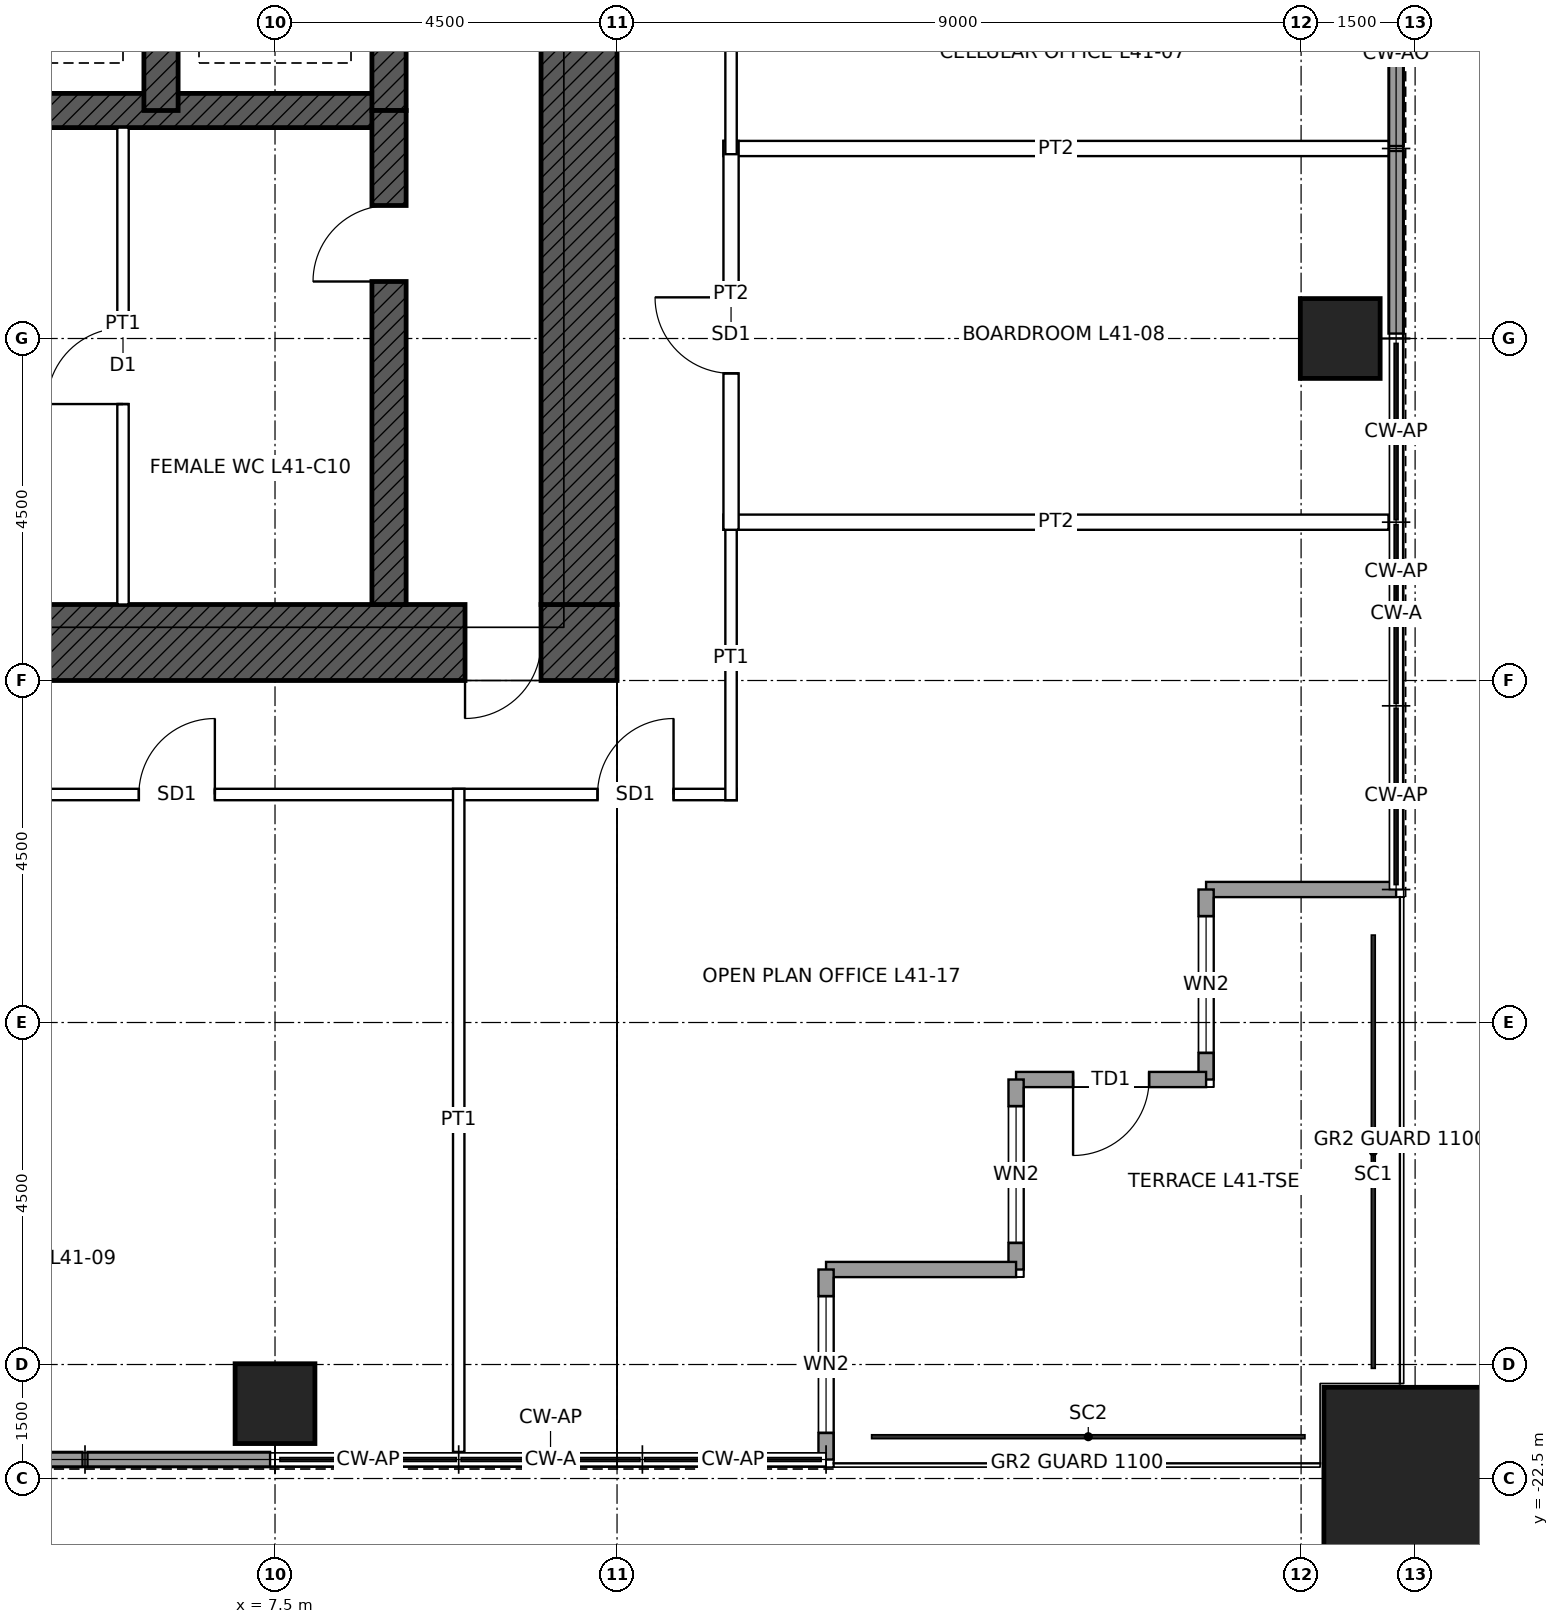
"""IFC4 building model, lengths in metres.
Left out: names, types, materials, properties, quantities, classifications, styles, units other than length and angle.
Written with IfcOpenShell. Run it as: python <this file> out.ifc"""

import sys

from ifc_helpers import new_model, si_unit, direction, frame, frame_2d, origin, origin_2d, place, context, subcontext, project, spatial, rectangle, hollow_rectangle, extrude, element, fill, save


model = new_model("IFC4")
c1 = context("Model", 3, precision=1e-05, world=origin(), true_north=direction((0.0, 1.0)))
c2 = subcontext(c1, "Body", "Model", "MODEL_VIEW")
j1 = project(units=[si_unit("LENGTHUNIT", "METRE"), si_unit("PLANEANGLEUNIT", "RADIAN")], contexts=[c1])
p1 = place(None, origin())
s1 = spatial("IfcSite", under=j1, at=p1, CompositionType="ELEMENT")
p2 = place(p1, origin())
s2 = spatial("IfcBuilding", under=s1, at=p2, CompositionType="ELEMENT")
p3 = place(p2, frame((0.0, 0.0, 197.9)))
s3 = spatial("IfcBuildingStorey", under=s2, at=p3, CompositionType="ELEMENT", Elevation=197.9)
p4 = place(p3, frame((22.5, -22.5, 0.0), z_axis=(0.0, 0.0, 1.0), x_axis=(1.0, 0.0, 0.0)))
e1 = element("IfcColumn", 1, at=p4, inside=s3, PredefinedType="COLUMN", context=c2, shape_type="SweptSolid", body=[
    extrude(hollow_rectangle(XDim=2.4, YDim=2.4, WallThickness=0.12, at=origin_2d()), origin(), (0.0, 0.0, 1.0), 4.0),
])
for number, where, z_axis, x_axis in (
    (2, (21.515, -7.5, 0.0), (0.0, 0.0, 1.0), (1.0, 0.0, 0.0)),
    (3, (7.5, -21.515, 0.0), (0.0, 0.0, 1.0), (1.0, 0.0, 0.0)),
):
    element("IfcColumn", number, at=place(p3, frame(where, z_axis=z_axis, x_axis=x_axis)), inside=s3, PredefinedType="COLUMN", context=c2, shape_type="SweptSolid", body=[
        extrude(hollow_rectangle(XDim=1.05, YDim=1.05, WallThickness=0.07, at=origin_2d()), origin(), (0.0, 0.0, 1.0), 4.0),
    ])
p5 = place(p3, frame((12.0, -11.5, 0.0), z_axis=(0.0, 0.0, 1.0), x_axis=(-1.0, 0.0, 0.0)))
e4 = element("IfcWall", 4, at=p5, inside=s3, PredefinedType="SHEAR", context=c2, shape_type="SweptSolid", body=[
    extrude(rectangle(XDim=24.0, YDim=1.0, at=frame_2d((12.0, 0.0))), origin(), (0.0, 0.0, 1.0), 4.0),
])
p6 = place(p5, frame((11.5, 0.0, 0.0)))
e5 = element("IfcOpeningElement", 5, at=p6, cuts=e4, PredefinedType="OPENING", context=c2, shape_type="SweptSolid", body=[
    extrude(rectangle(XDim=1.0, YDim=2.1, at=frame_2d((0.5, 1.05))), frame((0.0, 0.51, 0.0), z_axis=(0.0, -1.0, 0.0), x_axis=(1.0, 0.0, 0.0)), (0.0, 0.0, 1.0), 1.02),
])
p7 = place(p5, frame((1.0, 0.0, 0.0)))
e6 = element("IfcOpeningElement", 6, at=p7, cuts=e4, PredefinedType="OPENING", context=c2, shape_type="SweptSolid", body=[
    extrude(rectangle(XDim=1.0, YDim=2.4, at=frame_2d((0.5, 1.2))), frame((0.0, 0.51, 0.0), z_axis=(0.0, -1.0, 0.0), x_axis=(1.0, 0.0, 0.0)), (0.0, 0.0, 1.0), 1.02),
])
p8 = place(p3, frame((11.5, 11.0, 0.0), z_axis=(0.0, 0.0, 1.0), x_axis=(0.0, -1.0, 0.0)))
e7 = element("IfcWall", 7, at=p8, inside=s3, PredefinedType="SHEAR", context=c2, shape_type="SweptSolid", body=[
    extrude(rectangle(XDim=22.0, YDim=1.0, at=frame_2d((11.0, 0.0))), origin(), (0.0, 0.0, 1.0), 4.0),
])
p9 = place(p8, frame((10.5, 0.0, 0.0)))
e8 = element("IfcOpeningElement", 8, at=p9, cuts=e7, PredefinedType="OPENING", context=c2, shape_type="SweptSolid", body=[
    extrude(rectangle(XDim=1.0, YDim=2.4, at=frame_2d((0.5, 1.2))), frame((0.0, 0.51, 0.0), z_axis=(0.0, -1.0, 0.0), x_axis=(1.0, 0.0, 0.0)), (0.0, 0.0, 1.0), 1.02),
])
p10 = place(p3, frame((-9.0, -4.5, 0.0), z_axis=(0.0, 0.0, 1.0), x_axis=(1.0, 0.0, 0.0)))
e9 = element("IfcWall", 9, at=p10, inside=s3, PredefinedType="SHEAR", context=c2, shape_type="SweptSolid", body=[
    extrude(rectangle(XDim=18.0, YDim=0.45, at=frame_2d((9.0, 0.0))), origin(), (0.0, 0.0, 1.0), 4.0),
])
for number, where, z_axis, x_axis in (
    (10, (9.0, -4.5, 0.0), (0.0, 0.0, 1.0), (0.0, 1.0, 0.0)),
    (11, (6.0, -4.5, 0.0), (0.0, 0.0, 1.0), (0.0, 1.0, 0.0)),
):
    element("IfcWall", number, at=place(p3, frame(where, z_axis=z_axis, x_axis=x_axis)), inside=s3, PredefinedType="SHEAR", context=c2, shape_type="SweptSolid", body=[
        extrude(rectangle(XDim=3.0, YDim=0.45, at=frame_2d((1.5, 0.0))), origin(), (0.0, 0.0, 1.0), 4.0),
    ])
p11 = place(p3, frame((9.0, -11.0, 0.0), z_axis=(0.0, 0.0, 1.0), x_axis=(0.0, 1.0, 0.0)))
e12 = element("IfcWall", 12, at=p11, inside=s3, PredefinedType="SHEAR", context=c2, shape_type="SweptSolid", body=[
    extrude(rectangle(XDim=6.5, YDim=0.45, at=frame_2d((3.25, 0.0))), origin(), (0.0, 0.0, 1.0), 4.0),
])
p12 = place(p11, frame((4.25, 0.0, 0.0)))
e13 = element("IfcOpeningElement", 13, at=p12, cuts=e12, PredefinedType="OPENING", context=c2, shape_type="SweptSolid", body=[
    extrude(rectangle(XDim=1.0, YDim=2.1, at=frame_2d((0.5, 1.05))), frame((0.0, 0.235, 0.0), z_axis=(0.0, -1.0, 0.0), x_axis=(1.0, 0.0, 0.0)), (0.0, 0.0, 1.0), 0.47),
])
p13 = place(p3, frame((22.25, -14.75, 0.0), z_axis=(0.0, 0.0, 1.0), x_axis=(-1.0, 0.0, 0.0)))
e14 = element("IfcWall", 14, at=p13, inside=s3, PredefinedType="SOLIDWALL", context=c2, shape_type="SweptSolid", body=[
    extrude(rectangle(XDim=2.5, YDim=0.2, at=frame_2d((1.25, 0.0))), origin(), (0.0, 0.0, 1.0), 3.85),
])
p14 = place(p3, frame((19.75, -14.75, 0.0), z_axis=(0.0, 0.0, 1.0), x_axis=(0.0, -1.0, 0.0)))
e15 = element("IfcWall", 15, at=p14, inside=s3, PredefinedType="SOLIDWALL", context=c2, shape_type="SweptSolid", body=[
    extrude(rectangle(XDim=2.5, YDim=0.2, at=frame_2d((1.25, 0.0))), origin(), (0.0, 0.0, 1.0), 3.85),
])
p15 = place(p14, frame((0.35, 0.0, 0.3)))
e16 = element("IfcOpeningElement", 16, at=p15, cuts=e15, PredefinedType="OPENING", context=c2, shape_type="SweptSolid", body=[
    extrude(rectangle(XDim=1.8, YDim=2.4, at=frame_2d((0.9, 1.2))), frame((0.0, 0.11, 0.0), z_axis=(0.0, -1.0, 0.0), x_axis=(1.0, 0.0, 0.0)), (0.0, 0.0, 1.0), 0.22),
])
p16 = place(p3, frame((19.75, -17.25, 0.0), z_axis=(0.0, 0.0, 1.0), x_axis=(-1.0, 0.0, 0.0)))
e17 = element("IfcWall", 17, at=p16, inside=s3, PredefinedType="SOLIDWALL", context=c2, shape_type="SweptSolid", body=[
    extrude(rectangle(XDim=2.5, YDim=0.2, at=frame_2d((1.25, 0.0))), origin(), (0.0, 0.0, 1.0), 3.85),
])
p17 = place(p16, frame((0.75, 0.0, 0.0)))
e18 = element("IfcOpeningElement", 18, at=p17, cuts=e17, PredefinedType="OPENING", context=c2, shape_type="SweptSolid", body=[
    extrude(rectangle(XDim=1.0, YDim=2.4, at=frame_2d((0.5, 1.2))), frame((0.0, 0.11, 0.0), z_axis=(0.0, -1.0, 0.0), x_axis=(1.0, 0.0, 0.0)), (0.0, 0.0, 1.0), 0.22),
])
p18 = place(p3, frame((17.25, -17.25, 0.0), z_axis=(0.0, 0.0, 1.0), x_axis=(0.0, -1.0, 0.0)))
e19 = element("IfcWall", 19, at=p18, inside=s3, PredefinedType="SOLIDWALL", context=c2, shape_type="SweptSolid", body=[
    extrude(rectangle(XDim=2.5, YDim=0.2, at=frame_2d((1.25, 0.0))), origin(), (0.0, 0.0, 1.0), 3.85),
])
p19 = place(p18, frame((0.35, 0.0, 0.3)))
e20 = element("IfcOpeningElement", 20, at=p19, cuts=e19, PredefinedType="OPENING", context=c2, shape_type="SweptSolid", body=[
    extrude(rectangle(XDim=1.8, YDim=2.4, at=frame_2d((0.9, 1.2))), frame((0.0, 0.11, 0.0), z_axis=(0.0, -1.0, 0.0), x_axis=(1.0, 0.0, 0.0)), (0.0, 0.0, 1.0), 0.22),
])
p20 = place(p3, frame((17.25, -19.75, 0.0), z_axis=(0.0, 0.0, 1.0), x_axis=(-1.0, 0.0, 0.0)))
e21 = element("IfcWall", 21, at=p20, inside=s3, PredefinedType="SOLIDWALL", context=c2, shape_type="SweptSolid", body=[
    extrude(rectangle(XDim=2.5, YDim=0.2, at=frame_2d((1.25, 0.0))), origin(), (0.0, 0.0, 1.0), 3.85),
])
p21 = place(p3, frame((14.75, -19.75, 0.0), z_axis=(0.0, 0.0, 1.0), x_axis=(0.0, -1.0, 0.0)))
e22 = element("IfcWall", 22, at=p21, inside=s3, PredefinedType="SOLIDWALL", context=c2, shape_type="SweptSolid", body=[
    extrude(rectangle(XDim=2.5, YDim=0.2, at=frame_2d((1.25, 0.0))), origin(), (0.0, 0.0, 1.0), 3.85),
])
p22 = place(p21, frame((0.35, 0.0, 0.3)))
e23 = element("IfcOpeningElement", 23, at=p22, cuts=e22, PredefinedType="OPENING", context=c2, shape_type="SweptSolid", body=[
    extrude(rectangle(XDim=1.8, YDim=2.4, at=frame_2d((0.9, 1.2))), frame((0.0, 0.11, 0.0), z_axis=(0.0, -1.0, 0.0), x_axis=(1.0, 0.0, 0.0)), (0.0, 0.0, 1.0), 0.22),
])
p23 = place(p3, frame((22.25, -2.532, 0.0), z_axis=(0.0, 0.0, 1.0), x_axis=(0.0, -1.0, 0.0)))
e24 = element("IfcWall", 24, at=p23, inside=s3, PredefinedType="SOLIDWALL", context=c2, shape_type="SweptSolid", body=[
    extrude(rectangle(XDim=2.435, YDim=0.2, at=frame_2d((1.218, 0.0))), origin(), (0.0, 0.0, 1.0), 3.85),
])
for number, where, z_axis, x_axis in (
    (25, (22.25, -5.032, 0.0), (0.0, 0.0, 1.0), (0.0, -1.0, 0.0)),
    (26, (7.435, -22.25, 0.0), (0.0, 0.0, 1.0), (-1.0, 0.0, 0.0)),
):
    element("IfcWall", number, at=place(p3, frame(where, z_axis=z_axis, x_axis=x_axis)), inside=s3, PredefinedType="SOLIDWALL", context=c2, shape_type="SweptSolid", body=[
        extrude(rectangle(XDim=2.403, YDim=0.2, at=frame_2d((1.201, 0.0))), origin(), (0.0, 0.0, 1.0), 3.85),
    ])
p24 = place(p3, frame((4.968, -22.25, 0.0), z_axis=(0.0, 0.0, 1.0), x_axis=(-1.0, 0.0, 0.0)))
e27 = element("IfcWall", 27, at=p24, inside=s3, PredefinedType="SOLIDWALL", context=c2, shape_type="SweptSolid", body=[
    extrude(rectangle(XDim=2.435, YDim=0.2, at=frame_2d((1.218, 0.0))), origin(), (0.0, 0.0, 1.0), 3.85),
])
p25 = place(p3, frame((-13.575, -13.5, 0.0), z_axis=(0.0, 0.0, 1.0), x_axis=(1.0, 0.0, 0.0)))
e28 = element("IfcWall", 28, at=p25, inside=s3, PredefinedType="PARTITIONING", context=c2, shape_type="SweptSolid", body=[
    extrude(rectangle(XDim=27.15, YDim=0.15, at=frame_2d((13.575, 0.0))), origin(), (0.0, 0.0, 1.0), 3.85),
])
p26 = place(p25, frame((19.283, 0.0, 0.0)))
e29 = element("IfcOpeningElement", 29, at=p26, cuts=e28, PredefinedType="OPENING", context=c2, shape_type="SweptSolid", body=[
    extrude(rectangle(XDim=1.0, YDim=2.4, at=frame_2d((0.5, 1.2))), frame((0.0, 0.085, 0.0), z_axis=(0.0, -1.0, 0.0), x_axis=(1.0, 0.0, 0.0)), (0.0, 0.0, 1.0), 0.17),
])
p27 = place(p25, frame((9.325, 0.0, 0.0)))
e30 = element("IfcOpeningElement", 30, at=p27, cuts=e28, PredefinedType="OPENING", context=c2, shape_type="SweptSolid", body=[
    extrude(rectangle(XDim=1.0, YDim=2.1, at=frame_2d((0.5, 1.05))), frame((0.0, 0.085, 0.0), z_axis=(0.0, -1.0, 0.0), x_axis=(1.0, 0.0, 0.0)), (0.0, 0.0, 1.0), 0.17),
])
p28 = place(p25, frame((3.825, 0.0, 0.0)))
e31 = element("IfcOpeningElement", 31, at=p28, cuts=e28, PredefinedType="OPENING", context=c2, shape_type="SweptSolid", body=[
    extrude(rectangle(XDim=1.0, YDim=2.4, at=frame_2d((0.5, 1.2))), frame((0.0, 0.085, 0.0), z_axis=(0.0, -1.0, 0.0), x_axis=(1.0, 0.0, 0.0)), (0.0, 0.0, 1.0), 0.17),
])
p29 = place(p25, frame((25.318, 0.0, 0.0)))
e32 = element("IfcOpeningElement", 32, at=p29, cuts=e28, PredefinedType="OPENING", context=c2, shape_type="SweptSolid", body=[
    extrude(rectangle(XDim=1.0, YDim=2.4, at=frame_2d((0.5, 1.2))), frame((0.0, 0.085, 0.0), z_axis=(0.0, -1.0, 0.0), x_axis=(1.0, 0.0, 0.0)), (0.0, 0.0, 1.0), 0.17),
])
for number, where, z_axis, x_axis in (
    (33, (13.4, -9.917, 0.0), (0.0, 0.0, 1.0), (1.0, 0.0, 0.0)),
    (34, (13.4, -5.0, 0.0), (0.0, 0.0, 1.0), (1.0, 0.0, 0.0)),
):
    element("IfcWall", number, at=place(p3, frame(where, z_axis=z_axis, x_axis=x_axis)), inside=s3, PredefinedType="PARTITIONING", context=c2, shape_type="SweptSolid", body=[
        extrude(rectangle(XDim=8.75, YDim=0.2, at=frame_2d((4.375, 0.0))), origin(), (0.0, 0.0, 1.0), 3.85),
    ])
p30 = place(p3, frame((9.917, -22.15, 0.0), z_axis=(0.0, 0.0, 1.0), x_axis=(0.0, 1.0, 0.0)))
e35 = element("IfcWall", 35, at=p30, inside=s3, PredefinedType="PARTITIONING", context=c2, shape_type="SweptSolid", body=[
    extrude(rectangle(XDim=8.725, YDim=0.15, at=frame_2d((4.362, 0.0))), origin(), (0.0, 0.0, 1.0), 3.85),
])
p31 = place(p3, frame((13.5, -13.575, 0.0), z_axis=(0.0, 0.0, 1.0), x_axis=(0.0, 1.0, 0.0)))
e36 = element("IfcWall", 36, at=p31, inside=s3, PredefinedType="PARTITIONING", context=c2, shape_type="SweptSolid", body=[
    extrude(rectangle(XDim=3.733, YDim=0.15, at=frame_2d((1.866, 0.0))), origin(), (0.0, 0.0, 1.0), 3.85),
])
p32 = place(p3, frame((13.5, -10.017, 0.0), z_axis=(0.0, 0.0, 1.0), x_axis=(0.0, 1.0, 0.0)))
e37 = element("IfcWall", 37, at=p32, inside=s3, PredefinedType="PARTITIONING", context=c2, shape_type="SweptSolid", body=[
    extrude(rectangle(XDim=5.117, YDim=0.2, at=frame_2d((2.559, 0.0))), origin(), (0.0, 0.0, 1.0), 3.85),
])
p33 = place(p32, frame((2.059, 0.0, 0.0)))
e38 = element("IfcOpeningElement", 38, at=p33, cuts=e37, PredefinedType="OPENING", context=c2, shape_type="SweptSolid", body=[
    extrude(rectangle(XDim=1.0, YDim=2.4, at=frame_2d((0.5, 1.2))), frame((0.0, 0.11, 0.0), z_axis=(0.0, -1.0, 0.0), x_axis=(1.0, 0.0, 0.0)), (0.0, 0.0, 1.0), 0.22),
])
p34 = place(p3, frame((13.5, -5.075, 0.0), z_axis=(0.0, 0.0, 1.0), x_axis=(0.0, 1.0, 0.0)))
e39 = element("IfcWall", 39, at=p34, inside=s3, PredefinedType="PARTITIONING", context=c2, shape_type="SweptSolid", body=[
    extrude(rectangle(XDim=17.15, YDim=0.15, at=frame_2d((8.575, 0.0))), origin(), (0.0, 0.0, 1.0), 3.85),
])
p35 = place(p34, frame((2.975, 0.0, 0.0)))
e40 = element("IfcOpeningElement", 40, at=p35, cuts=e39, PredefinedType="OPENING", context=c2, shape_type="SweptSolid", body=[
    extrude(rectangle(XDim=1.0, YDim=2.4, at=frame_2d((0.5, 1.2))), frame((0.0, 0.085, 0.0), z_axis=(0.0, -1.0, 0.0), x_axis=(1.0, 0.0, 0.0)), (0.0, 0.0, 1.0), 0.17),
])
p36 = place(p34, frame((15.533, 0.0, 0.0)))
e41 = element("IfcOpeningElement", 41, at=p36, cuts=e39, PredefinedType="OPENING", context=c2, shape_type="SweptSolid", body=[
    extrude(rectangle(XDim=1.0, YDim=2.4, at=frame_2d((0.5, 1.2))), frame((0.0, 0.085, 0.0), z_axis=(0.0, -1.0, 0.0), x_axis=(1.0, 0.0, 0.0)), (0.0, 0.0, 1.0), 0.17),
])
p37 = place(p3, frame((5.5, -11.0, 0.0), z_axis=(0.0, 0.0, 1.0), x_axis=(0.0, 1.0, 0.0)))
e42 = element("IfcWall", 42, at=p37, inside=s3, PredefinedType="PARTITIONING", context=c2, shape_type="SweptSolid", body=[
    extrude(rectangle(XDim=6.275, YDim=0.15, at=frame_2d((3.137, 0.0))), origin(), (0.0, 0.0, 1.0), 3.75),
])
p38 = place(p37, frame((2.637, 0.0, 0.0)))
e43 = element("IfcOpeningElement", 43, at=p38, cuts=e42, PredefinedType="OPENING", context=c2, shape_type="SweptSolid", body=[
    extrude(rectangle(XDim=1.0, YDim=2.1, at=frame_2d((0.5, 1.05))), frame((0.0, 0.085, 0.0), z_axis=(0.0, -1.0, 0.0), x_axis=(1.0, 0.0, 0.0)), (0.0, 0.0, 1.0), 0.17),
])
p39 = place(p15, origin())
e44 = element("IfcWindow", 44, at=p39, inside=s3, PartitioningType="SINGLE_PANEL", PredefinedType="WINDOW", context=c2, shape_type="SweptSolid", body=[
    extrude(rectangle(XDim=1.8, YDim=2.4, at=frame_2d((0.9, 1.2))), frame((0.0, 0.03, 0.0), z_axis=(0.0, -1.0, 0.0), x_axis=(1.0, 0.0, 0.0)), (0.0, 0.0, 1.0), 0.06),
])
fill(e16, e44)
p40 = place(p17, origin())
e45 = element("IfcDoor", 45, at=p40, inside=s3, OperationType="SINGLE_SWING_RIGHT", PredefinedType="DOOR", context=c2, shape_type="SweptSolid", body=[
    extrude(rectangle(XDim=1.0, YDim=2.4, at=frame_2d((0.5, 1.2))), frame((0.0, 0.025, 0.0), z_axis=(0.0, -1.0, 0.0), x_axis=(1.0, 0.0, 0.0)), (0.0, 0.0, 1.0), 0.05),
])
fill(e18, e45)
p41 = place(p19, origin())
e46 = element("IfcWindow", 46, at=p41, inside=s3, PartitioningType="SINGLE_PANEL", PredefinedType="WINDOW", context=c2, shape_type="SweptSolid", body=[
    extrude(rectangle(XDim=1.8, YDim=2.4, at=frame_2d((0.9, 1.2))), frame((0.0, 0.03, 0.0), z_axis=(0.0, -1.0, 0.0), x_axis=(1.0, 0.0, 0.0)), (0.0, 0.0, 1.0), 0.06),
])
fill(e20, e46)
p42 = place(p22, origin())
e47 = element("IfcWindow", 47, at=p42, inside=s3, PartitioningType="SINGLE_PANEL", PredefinedType="WINDOW", context=c2, shape_type="SweptSolid", body=[
    extrude(rectangle(XDim=1.8, YDim=2.4, at=frame_2d((0.9, 1.2))), frame((0.0, 0.03, 0.0), z_axis=(0.0, -1.0, 0.0), x_axis=(1.0, 0.0, 0.0)), (0.0, 0.0, 1.0), 0.06),
])
fill(e23, e47)
p43 = place(p7, origin())
e48 = element("IfcDoor", 48, at=p43, inside=s3, OperationType="SINGLE_SWING_RIGHT", PredefinedType="DOOR", context=c2, shape_type="SweptSolid", body=[
    extrude(rectangle(XDim=1.0, YDim=2.4, at=frame_2d((0.5, 1.2))), frame((0.0, 0.485, 0.0), z_axis=(0.0, -1.0, 0.0), x_axis=(1.0, 0.0, 0.0)), (0.0, 0.0, 1.0), 0.05),
])
fill(e6, e48)
p44 = place(p12, origin())
e49 = element("IfcDoor", 49, at=p44, inside=s3, OperationType="SINGLE_SWING_LEFT", PredefinedType="DOOR", context=c2, shape_type="SweptSolid", body=[
    extrude(rectangle(XDim=1.0, YDim=2.1, at=frame_2d((0.5, 1.05))), frame((0.0, 0.025, 0.0), z_axis=(0.0, -1.0, 0.0), x_axis=(1.0, 0.0, 0.0)), (0.0, 0.0, 1.0), 0.05),
])
fill(e13, e49)
p45 = place(p38, origin())
e50 = element("IfcDoor", 50, at=p45, inside=s3, OperationType="SINGLE_SWING_LEFT", PredefinedType="DOOR", context=c2, shape_type="SweptSolid", body=[
    extrude(rectangle(XDim=1.0, YDim=2.1, at=frame_2d((0.5, 1.05))), frame((0.0, 0.025, 0.0), z_axis=(0.0, -1.0, 0.0), x_axis=(1.0, 0.0, 0.0)), (0.0, 0.0, 1.0), 0.05),
])
fill(e43, e50)
p46 = place(p33, origin())
e51 = element("IfcDoor", 51, at=p46, inside=s3, OperationType="SINGLE_SWING_RIGHT", PredefinedType="DOOR", context=c2, shape_type="SweptSolid", body=[
    extrude(rectangle(XDim=1.0, YDim=2.4, at=frame_2d((0.5, 1.2))), frame((0.0, 0.025, 0.0), z_axis=(0.0, -1.0, 0.0), x_axis=(1.0, 0.0, 0.0)), (0.0, 0.0, 1.0), 0.05),
])
fill(e38, e51)
p47 = place(p26, origin())
e52 = element("IfcDoor", 52, at=p47, inside=s3, OperationType="SINGLE_SWING_RIGHT", PredefinedType="DOOR", context=c2, shape_type="SweptSolid", body=[
    extrude(rectangle(XDim=1.0, YDim=2.4, at=frame_2d((0.5, 1.2))), frame((0.0, 0.025, 0.0), z_axis=(0.0, -1.0, 0.0), x_axis=(1.0, 0.0, 0.0)), (0.0, 0.0, 1.0), 0.05),
])
fill(e29, e52)
p48 = place(p29, origin())
e53 = element("IfcDoor", 53, at=p48, inside=s3, OperationType="SINGLE_SWING_RIGHT", PredefinedType="DOOR", context=c2, shape_type="SweptSolid", body=[
    extrude(rectangle(XDim=1.0, YDim=2.4, at=frame_2d((0.5, 1.2))), frame((0.0, 0.025, 0.0), z_axis=(0.0, -1.0, 0.0), x_axis=(1.0, 0.0, 0.0)), (0.0, 0.0, 1.0), 0.05),
])
fill(e32, e53)
save(model, sys.argv[1])
